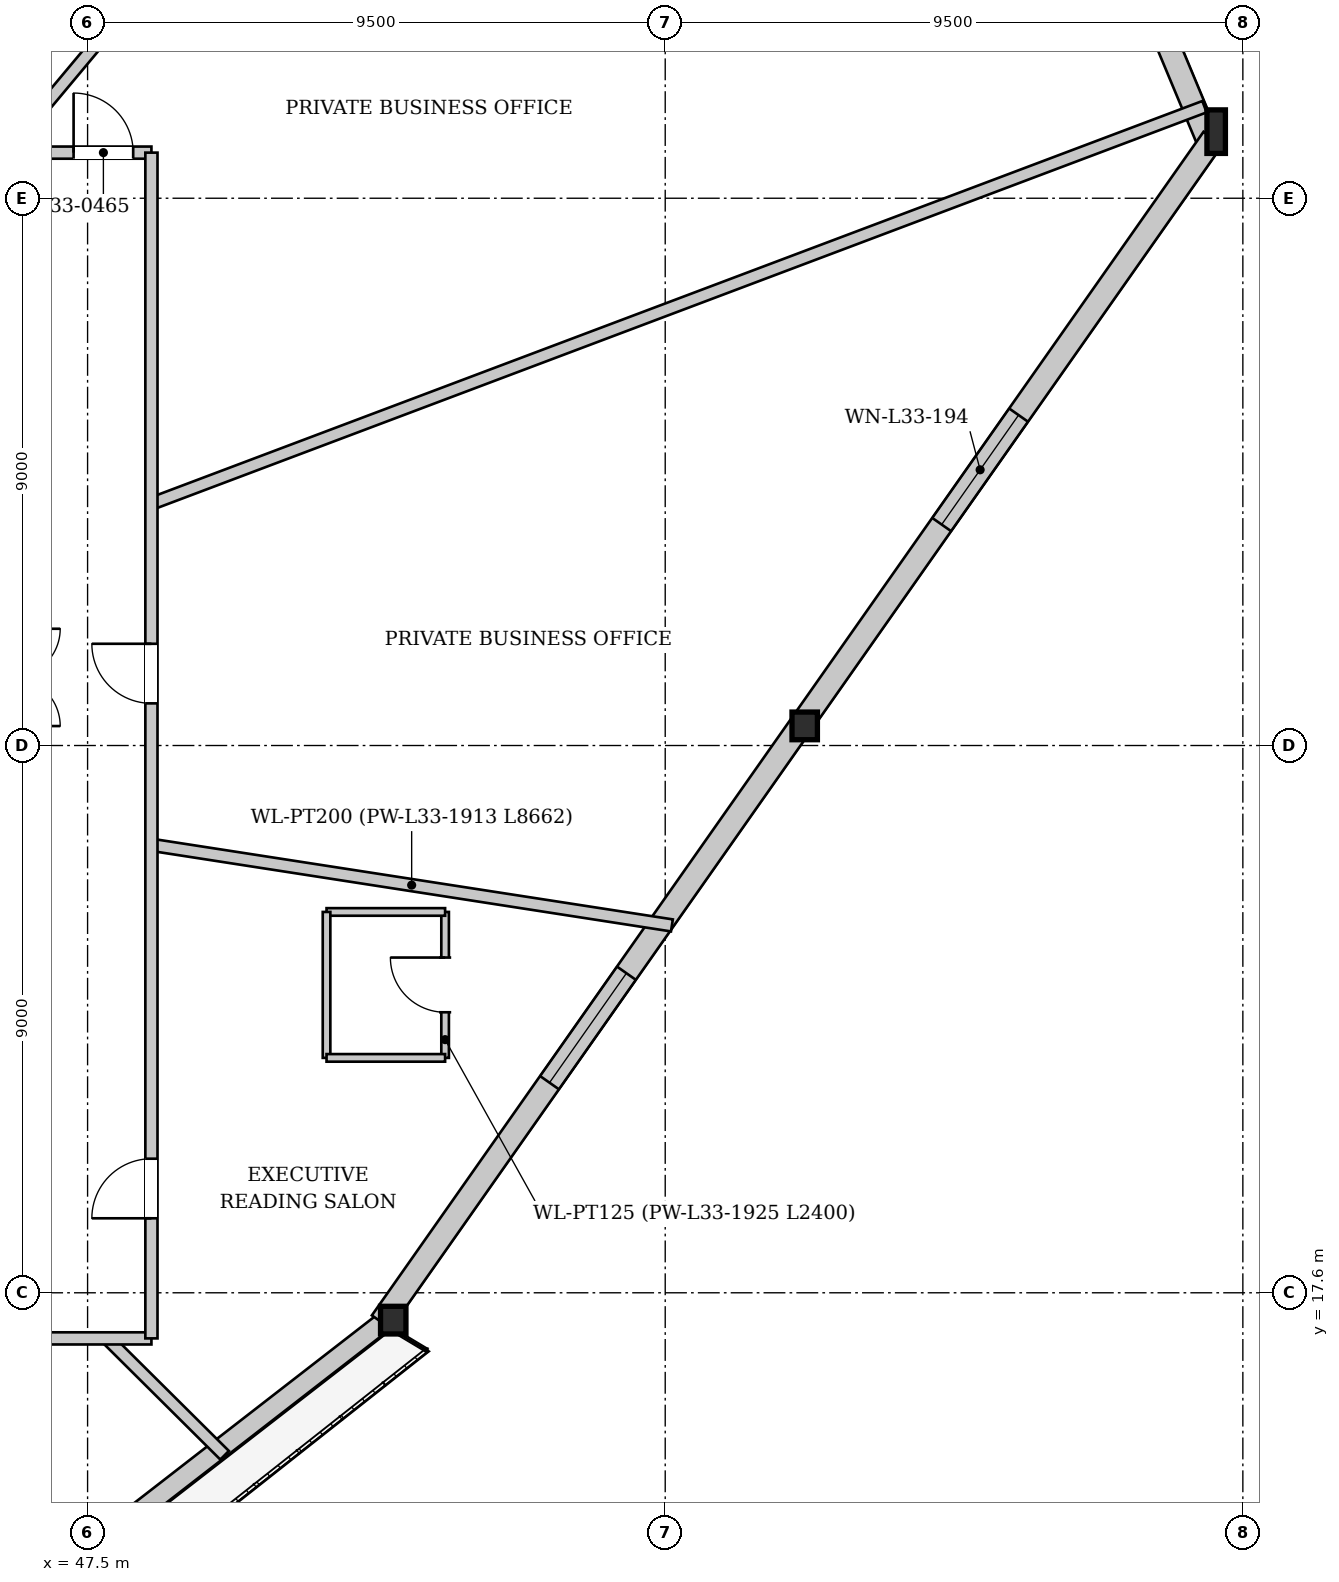
"""IFC4 building model, lengths in metres.
Left out: names, types, materials, properties, quantities, classifications, styles, units other than length and angle.
Written with IfcOpenShell. Run it as: python <this file> out.ifc"""

import sys

from ifc_helpers import new_model, si_unit, direction, frame, frame_2d, origin, origin_2d, place, context, subcontext, project, spatial, rectangle, i_section, extrude, source, transform, mapped, element, fill, save


model = new_model("IFC4")
c1 = context("Model", 3, precision=1e-05, world=origin(), true_north=direction((0.0, 1.0)))
c2 = subcontext(c1, "Body", "Model", "MODEL_VIEW")
j1 = project(units=[si_unit("LENGTHUNIT", "METRE"), si_unit("PLANEANGLEUNIT", "RADIAN")], contexts=[c1])
p1 = place(None, origin())
s1 = spatial("IfcSite", under=j1, at=p1, CompositionType="ELEMENT")
p2 = place(p1, origin())
s2 = spatial("IfcBuilding", under=s1, at=p2, CompositionType="ELEMENT")
p3 = place(p2, frame((0.0, 0.0, 127.0)))
s3 = spatial("IfcBuildingStorey", under=s2, at=p3, CompositionType="ELEMENT", Elevation=127.0)
m1 = source(origin(), c2, "Body", "SweptSolid", [
    extrude(i_section(OverallWidth=0.304, OverallDepth=0.716, WebThickness=0.021, FlangeThickness=0.04, at=origin_2d()), origin(), (0.0, 0.0, 1.0), 3.42),
])
p4 = place(p3, frame((66.164, 36.475, 0.0), z_axis=(-0.060324237266, 0.1289296716, 0.989817218571), x_axis=(-0.905759865851, -0.42379129936, 0.0)))
e1 = element("IfcColumn", 1, at=p4, inside=s3, PredefinedType="COLUMN", context=c2, shape_type="MappedRepresentation", body=[
    mapped(m1, transform((0.0, 0.0, 0.0), x_axis=(1.0, 0.0, 0.0), y_axis=(0.0, 1.0, 0.0), z_axis=(0.0, 0.0, 1.0), scale=1.0)),
])
m2 = source(origin(), c2, "Body", "SweptSolid", [
    extrude(i_section(OverallWidth=0.418, OverallDepth=0.455, WebThickness=0.038, FlangeThickness=0.059, at=origin_2d()), origin(), (0.0, 0.0, 1.0), 3.398),
])
p5 = place(p3, frame((52.487, 17.01, 0.0), z_axis=(0.023784635313, 0.082635439911, 0.996295977706), x_axis=(-0.960986046082, 0.276596853264, 0.0)))
e2 = element("IfcColumn", 2, at=p5, inside=s3, PredefinedType="COLUMN", context=c2, shape_type="MappedRepresentation", body=[
    mapped(m2, transform((0.0, 0.0, 0.0), x_axis=(1.0, 0.0, 0.0), y_axis=(0.0, 1.0, 0.0), z_axis=(0.0, 0.0, 1.0), scale=1.0)),
])
m3 = source(origin(), c2, "Body", "SweptSolid", [
    extrude(i_section(OverallWidth=0.418, OverallDepth=0.455, WebThickness=0.038, FlangeThickness=0.059, at=origin_2d()), origin(), (0.0, 0.0, 1.0), 3.405),
])
p6 = place(p3, frame((59.325, 26.742, 0.0), z_axis=(-0.018428325384, 0.105980797343, 0.994197398618), x_axis=(-0.985216646805, -0.171313043457, 0.0)))
e3 = element("IfcColumn", 3, at=p6, inside=s3, PredefinedType="COLUMN", context=c2, shape_type="MappedRepresentation", body=[
    mapped(m3, transform((0.0, 0.0, 0.0), x_axis=(1.0, 0.0, 0.0), y_axis=(0.0, 1.0, 0.0), z_axis=(0.0, 0.0, 1.0), scale=1.0)),
])
p7 = place(p3, frame((52.388, 17.136, 0.0), z_axis=(0.0, 0.0, 1.0), x_axis=(-0.790214020135, -0.612830973746, 0.0)))
e4 = element("IfcWall", 4, at=p7, inside=s3, PredefinedType="SOLIDWALL", context=c2, shape_type="SweptSolid", body=[
    extrude(rectangle(XDim=23.79, YDim=0.32, at=frame_2d((11.895, 0.0))), origin(), (0.0, 0.0, 1.0), 2.692),
])
p8 = place(p7, frame((7.063, 0.0, 0.0)))
e5 = element("IfcOpeningElement", 5, at=p8, cuts=e4, PredefinedType="OPENING", context=c2, shape_type="SweptSolid", body=[
    extrude(rectangle(XDim=1.1, YDim=2.3, at=frame_2d((0.55, 1.15))), frame((0.0, 0.17, 0.0), z_axis=(0.0, -1.0, 0.0), x_axis=(1.0, 0.0, 0.0)), (0.0, 0.0, 1.0), 0.34),
])
p9 = place(p7, frame((16.705, 0.0, 0.372)))
e6 = element("IfcOpeningElement", 6, at=p9, cuts=e4, PredefinedType="OPENING", context=c2, shape_type="SweptSolid", body=[
    extrude(rectangle(XDim=1.8, YDim=2.2, at=frame_2d((0.9, 1.1))), frame((0.0, 0.17, 0.0), z_axis=(0.0, -1.0, 0.0), x_axis=(1.0, 0.0, 0.0)), (0.0, 0.0, 1.0), 0.34),
])
p10 = place(p3, frame((64.53, 39.898, 0.0), z_axis=(0.0, 0.0, 1.0), x_axis=(0.38513691565, -0.92285944553, 0.0)))
e7 = element("IfcWall", 7, at=p10, inside=s3, PredefinedType="SOLIDWALL", context=c2, shape_type="SweptSolid", body=[
    extrude(rectangle(XDim=3.789, YDim=0.38, at=frame_2d((1.895, 0.0))), origin(), (0.0, 0.0, 1.0), 2.692),
])
p11 = place(p3, frame((66.009, 36.584, 0.0), z_axis=(0.0, 0.0, 1.0), x_axis=(-0.574933262146, -0.818200308041, 0.0)))
e8 = element("IfcWall", 8, at=p11, inside=s3, PredefinedType="SOLIDWALL", context=c2, shape_type="SweptSolid", body=[
    extrude(rectangle(XDim=23.79, YDim=0.38, at=frame_2d((11.895, 0.0))), origin(), (0.0, 0.0, 1.0), 2.692),
])
p12 = place(p11, frame((5.561, 0.0, 0.322)))
e9 = element("IfcOpeningElement", 9, at=p12, cuts=e8, PredefinedType="OPENING", context=c2, shape_type="SweptSolid", body=[
    extrude(rectangle(XDim=2.2, YDim=2.25, at=frame_2d((1.1, 1.125))), frame((0.0, 0.2, 0.0), z_axis=(0.0, -1.0, 0.0), x_axis=(1.0, 0.0, 0.0)), (0.0, 0.0, 1.0), 0.4),
])
p13 = place(p11, frame((16.779, 0.0, 0.322)))
e10 = element("IfcOpeningElement", 10, at=p13, cuts=e8, PredefinedType="OPENING", context=c2, shape_type="SweptSolid", body=[
    extrude(rectangle(XDim=2.2, YDim=2.25, at=frame_2d((1.1, 1.125))), frame((0.0, 0.2, 0.0), z_axis=(0.0, -1.0, 0.0), x_axis=(1.0, 0.0, 0.0)), (0.0, 0.0, 1.0), 0.4),
])
p14 = place(p3, frame((48.55, 24.967, 0.0), z_axis=(0.0, 0.0, 1.0), x_axis=(0.988227888749, -0.152989018884, 0.0)))
e11 = element("IfcWall", 11, at=p14, inside=s3, PredefinedType="PARTITIONING", context=c2, shape_type="SweptSolid", body=[
    extrude(rectangle(XDim=8.662, YDim=0.2, at=frame_2d((4.331, 0.0))), origin(), (0.0, 0.0, 1.0), 3.3),
])
p15 = place(p3, frame((48.55, 30.577, 0.0), z_axis=(0.0, 0.0, 1.0), x_axis=(0.935722269148, 0.352737629154, 0.0)))
e12 = element("IfcWall", 12, at=p15, inside=s3, PredefinedType="PARTITIONING", context=c2, shape_type="SweptSolid", body=[
    extrude(rectangle(XDim=18.508, YDim=0.2, at=frame_2d((9.254, 0.0))), origin(), (0.0, 0.0, 1.0), 2.795),
])
p16 = place(p3, frame((46.15, 36.35, 0.0), z_axis=(0.0, 0.0, 1.0), x_axis=(0.641321489546, 0.767272276996, 0.0)))
e13 = element("IfcWall", 13, at=p16, inside=s3, PredefinedType="PARTITIONING", context=c2, shape_type="SweptSolid", body=[
    extrude(rectangle(XDim=7.746, YDim=0.2, at=frame_2d((3.873, 0.0))), origin(), (0.0, 0.0, 1.0), 3.3),
])
p17 = place(p3, frame((47.818, 16.85, 0.0), z_axis=(0.0, 0.0, 1.0), x_axis=(0.709519636275, -0.704685664491, 0.0)))
e14 = element("IfcWall", 14, at=p17, inside=s3, PredefinedType="PARTITIONING", context=c2, shape_type="SweptSolid", body=[
    extrude(rectangle(XDim=2.727, YDim=0.2, at=frame_2d((1.364, 0.0))), origin(), (0.0, 0.0, 1.0), 3.3),
])
p18 = place(p3, frame((53.38, 21.463, 0.0), z_axis=(0.0, 0.0, 1.0), x_axis=(0.0, 1.0, 0.0)))
e15 = element("IfcWall", 15, at=p18, inside=s3, PredefinedType="PARTITIONING", context=c2, shape_type="SweptSolid", body=[
    extrude(rectangle(XDim=2.4, YDim=0.125, at=frame_2d((1.2, 0.0))), origin(), (0.0, 0.0, 1.0), 3.3),
])
p19 = place(p18, frame((0.75, 0.0, 0.0)))
e16 = element("IfcOpeningElement", 16, at=p19, cuts=e15, PredefinedType="OPENING", context=c2, shape_type="SweptSolid", body=[
    extrude(rectangle(XDim=0.9, YDim=2.1, at=frame_2d((0.45, 1.05))), frame((0.0, 0.073, 0.0), z_axis=(0.0, -1.0, 0.0), x_axis=(1.0, 0.0, 0.0)), (0.0, 0.0, 1.0), 0.145),
])
p20 = place(p3, frame((53.38, 23.863, 0.0), z_axis=(0.0, 0.0, 1.0), x_axis=(-1.0, 0.0, 0.0)))
e17 = element("IfcWall", 17, at=p20, inside=s3, PredefinedType="PARTITIONING", context=c2, shape_type="SweptSolid", body=[
    extrude(rectangle(XDim=1.95, YDim=0.125, at=frame_2d((0.975, 0.0))), origin(), (0.0, 0.0, 1.0), 3.3),
])
p21 = place(p3, frame((51.43, 23.863, 0.0), z_axis=(0.0, 0.0, 1.0), x_axis=(0.0, -1.0, 0.0)))
e18 = element("IfcWall", 18, at=p21, inside=s3, PredefinedType="PARTITIONING", context=c2, shape_type="SweptSolid", body=[
    extrude(rectangle(XDim=2.4, YDim=0.125, at=frame_2d((1.2, 0.0))), origin(), (0.0, 0.0, 1.0), 3.3),
])
p22 = place(p3, frame((51.43, 21.463, 0.0), z_axis=(0.0, 0.0, 1.0), x_axis=(1.0, 0.0, 0.0)))
e19 = element("IfcWall", 19, at=p22, inside=s3, PredefinedType="PARTITIONING", context=c2, shape_type="SweptSolid", body=[
    extrude(rectangle(XDim=1.95, YDim=0.125, at=frame_2d((0.975, 0.0))), origin(), (0.0, 0.0, 1.0), 3.3),
])
p23 = place(p3, frame((27.45, 16.85, 0.0), z_axis=(0.0, 0.0, 1.0), x_axis=(1.0, 0.0, 0.0)))
e20 = element("IfcWall", 20, at=p23, inside=s3, PredefinedType="PARTITIONING", context=c2, shape_type="SweptSolid", body=[
    extrude(rectangle(XDim=21.1, YDim=0.2, at=frame_2d((10.55, 0.0))), origin(), (0.0, 0.0, 1.0), 3.3),
])
p24 = place(p23, frame((2.412, 0.0, 0.0)))
e21 = element("IfcOpeningElement", 21, at=p24, cuts=e20, PredefinedType="OPENING", context=c2, shape_type="SweptSolid", body=[
    extrude(rectangle(XDim=0.98, YDim=2.15, at=frame_2d((0.49, 1.075))), frame((0.0, 0.11, 0.0), z_axis=(0.0, -1.0, 0.0), x_axis=(1.0, 0.0, 0.0)), (0.0, 0.0, 1.0), 0.22),
])
p25 = place(p23, frame((9.269, 0.0, 0.0)))
e22 = element("IfcOpeningElement", 22, at=p25, cuts=e20, PredefinedType="OPENING", context=c2, shape_type="SweptSolid", body=[
    extrude(rectangle(XDim=0.98, YDim=2.15, at=frame_2d((0.49, 1.075))), frame((0.0, 0.11, 0.0), z_axis=(0.0, -1.0, 0.0), x_axis=(1.0, 0.0, 0.0)), (0.0, 0.0, 1.0), 0.22),
])
p26 = place(p23, frame((16.109, 0.0, 0.0)))
e23 = element("IfcOpeningElement", 23, at=p26, cuts=e20, PredefinedType="OPENING", context=c2, shape_type="SweptSolid", body=[
    extrude(rectangle(XDim=0.98, YDim=2.15, at=frame_2d((0.49, 1.075))), frame((0.0, 0.11, 0.0), z_axis=(0.0, -1.0, 0.0), x_axis=(1.0, 0.0, 0.0)), (0.0, 0.0, 1.0), 0.22),
])
p27 = place(p3, frame((27.45, 36.35, 0.0), z_axis=(0.0, 0.0, 1.0), x_axis=(1.0, 0.0, 0.0)))
e24 = element("IfcWall", 24, at=p27, inside=s3, PredefinedType="PARTITIONING", context=c2, shape_type="SweptSolid", body=[
    extrude(rectangle(XDim=21.1, YDim=0.2, at=frame_2d((10.55, 0.0))), origin(), (0.0, 0.0, 1.0), 3.3),
])
p28 = place(p27, frame((19.82, 0.0, 0.0)))
e25 = element("IfcOpeningElement", 25, at=p28, cuts=e24, PredefinedType="OPENING", context=c2, shape_type="SweptSolid", body=[
    extrude(rectangle(XDim=0.98, YDim=2.15, at=frame_2d((0.49, 1.075))), frame((0.0, 0.11, 0.0), z_axis=(0.0, -1.0, 0.0), x_axis=(1.0, 0.0, 0.0)), (0.0, 0.0, 1.0), 0.22),
])
p29 = place(p27, frame((16.504, 0.0, 0.0)))
e26 = element("IfcOpeningElement", 26, at=p29, cuts=e24, PredefinedType="OPENING", context=c2, shape_type="SweptSolid", body=[
    extrude(rectangle(XDim=0.98, YDim=2.15, at=frame_2d((0.49, 1.075))), frame((0.0, 0.11, 0.0), z_axis=(0.0, -1.0, 0.0), x_axis=(1.0, 0.0, 0.0)), (0.0, 0.0, 1.0), 0.22),
])
p30 = place(p27, frame((9.034, 0.0, 0.0)))
e27 = element("IfcOpeningElement", 27, at=p30, cuts=e24, PredefinedType="OPENING", context=c2, shape_type="SweptSolid", body=[
    extrude(rectangle(XDim=0.98, YDim=2.15, at=frame_2d((0.49, 1.075))), frame((0.0, 0.11, 0.0), z_axis=(0.0, -1.0, 0.0), x_axis=(1.0, 0.0, 0.0)), (0.0, 0.0, 1.0), 0.22),
])
p31 = place(p27, frame((1.17, 0.0, 0.0)))
e28 = element("IfcOpeningElement", 28, at=p31, cuts=e24, PredefinedType="OPENING", context=c2, shape_type="SweptSolid", body=[
    extrude(rectangle(XDim=0.98, YDim=2.15, at=frame_2d((0.49, 1.075))), frame((0.0, 0.11, 0.0), z_axis=(0.0, -1.0, 0.0), x_axis=(1.0, 0.0, 0.0)), (0.0, 0.0, 1.0), 0.22),
])
p32 = place(p3, frame((48.55, 16.85, 0.0), z_axis=(0.0, 0.0, 1.0), x_axis=(0.0, 1.0, 0.0)))
e29 = element("IfcWall", 29, at=p32, inside=s3, PredefinedType="PARTITIONING", context=c2, shape_type="SweptSolid", body=[
    extrude(rectangle(XDim=19.5, YDim=0.2, at=frame_2d((9.75, 0.0))), origin(), (0.0, 0.0, 1.0), 3.3),
])
p33 = place(p32, frame((10.443, 0.0, 0.0)))
e30 = element("IfcOpeningElement", 30, at=p33, cuts=e29, PredefinedType="OPENING", context=c2, shape_type="SweptSolid", body=[
    extrude(rectangle(XDim=0.98, YDim=2.15, at=frame_2d((0.49, 1.075))), frame((0.0, 0.11, 0.0), z_axis=(0.0, -1.0, 0.0), x_axis=(1.0, 0.0, 0.0)), (0.0, 0.0, 1.0), 0.22),
])
p34 = place(p32, frame((1.975, 0.0, 0.0)))
e31 = element("IfcOpeningElement", 31, at=p34, cuts=e29, PredefinedType="OPENING", context=c2, shape_type="SweptSolid", body=[
    extrude(rectangle(XDim=0.98, YDim=2.15, at=frame_2d((0.49, 1.075))), frame((0.0, 0.11, 0.0), z_axis=(0.0, -1.0, 0.0), x_axis=(1.0, 0.0, 0.0)), (0.0, 0.0, 1.0), 0.22),
])
m4 = source(origin(), c2, "Body", "SweptSolid", [
    extrude(rectangle(XDim=2.2, YDim=2.25, at=frame_2d((1.1, 1.125))), frame((0.0, 0.03, 0.0), z_axis=(0.0, -1.0, 0.0), x_axis=(1.0, 0.0, 0.0)), (0.0, 0.0, 1.0), 0.06),
])
p35 = place(p12, origin())
e32 = element("IfcWindow", 32, at=p35, inside=s3, PartitioningType="SINGLE_PANEL", PredefinedType="WINDOW", context=c2, shape_type="MappedRepresentation", body=[
    mapped(m4, transform((0.0, 0.0, 0.0), x_axis=(1.0, 0.0, 0.0), y_axis=(0.0, 1.0, 0.0), z_axis=(0.0, 0.0, 1.0), scale=1.0)),
])
fill(e9, e32)
p36 = place(p13, origin())
e33 = element("IfcWindow", 33, at=p36, inside=s3, PartitioningType="SINGLE_PANEL", PredefinedType="WINDOW", context=c2, shape_type="MappedRepresentation", body=[
    mapped(m4, transform((0.0, 0.0, 0.0), x_axis=(1.0, 0.0, 0.0), y_axis=(0.0, 1.0, 0.0), z_axis=(0.0, 0.0, 1.0), scale=1.0)),
])
fill(e10, e33)
m5 = source(origin(), c2, "Body", "SweptSolid", [
    extrude(rectangle(XDim=0.9, YDim=2.1, at=frame_2d((0.45, 1.05))), frame((0.0, 0.025, 0.0), z_axis=(0.0, -1.0, 0.0), x_axis=(1.0, 0.0, 0.0)), (0.0, 0.0, 1.0), 0.05),
])
p37 = place(p19, origin())
e34 = element("IfcDoor", 34, at=p37, inside=s3, OperationType="SINGLE_SWING_RIGHT", PredefinedType="DOOR", context=c2, shape_type="MappedRepresentation", body=[
    mapped(m5, transform((0.0, 0.0, 0.0), x_axis=(1.0, 0.0, 0.0), y_axis=(0.0, 1.0, 0.0), z_axis=(0.0, 0.0, 1.0), scale=1.0)),
])
fill(e16, e34)
m6 = source(origin(), c2, "Body", "SweptSolid", [
    extrude(rectangle(XDim=0.98, YDim=2.15, at=frame_2d((0.49, 1.075))), frame((0.0, 0.025, 0.0), z_axis=(0.0, -1.0, 0.0), x_axis=(1.0, 0.0, 0.0)), (0.0, 0.0, 1.0), 0.05),
])
p38 = place(p28, origin())
e35 = element("IfcDoor", 35, at=p38, inside=s3, OperationType="SINGLE_SWING_LEFT", PredefinedType="DOOR", context=c2, shape_type="MappedRepresentation", body=[
    mapped(m6, transform((0.0, 0.0, 0.0), x_axis=(1.0, 0.0, 0.0), y_axis=(0.0, 1.0, 0.0), z_axis=(0.0, 0.0, 1.0), scale=1.0)),
])
fill(e25, e35)
p39 = place(p33, origin())
e36 = element("IfcDoor", 36, at=p39, inside=s3, OperationType="SINGLE_SWING_RIGHT", PredefinedType="DOOR", context=c2, shape_type="MappedRepresentation", body=[
    mapped(m6, transform((0.0, 0.0, 0.0), x_axis=(1.0, 0.0, 0.0), y_axis=(0.0, 1.0, 0.0), z_axis=(0.0, 0.0, 1.0), scale=1.0)),
])
fill(e30, e36)
p40 = place(p34, origin())
e37 = element("IfcDoor", 37, at=p40, inside=s3, OperationType="SINGLE_SWING_LEFT", PredefinedType="DOOR", context=c2, shape_type="MappedRepresentation", body=[
    mapped(m6, transform((0.0, 0.0, 0.0), x_axis=(1.0, 0.0, 0.0), y_axis=(0.0, 1.0, 0.0), z_axis=(0.0, 0.0, 1.0), scale=1.0)),
])
fill(e31, e37)
save(model, sys.argv[1])
